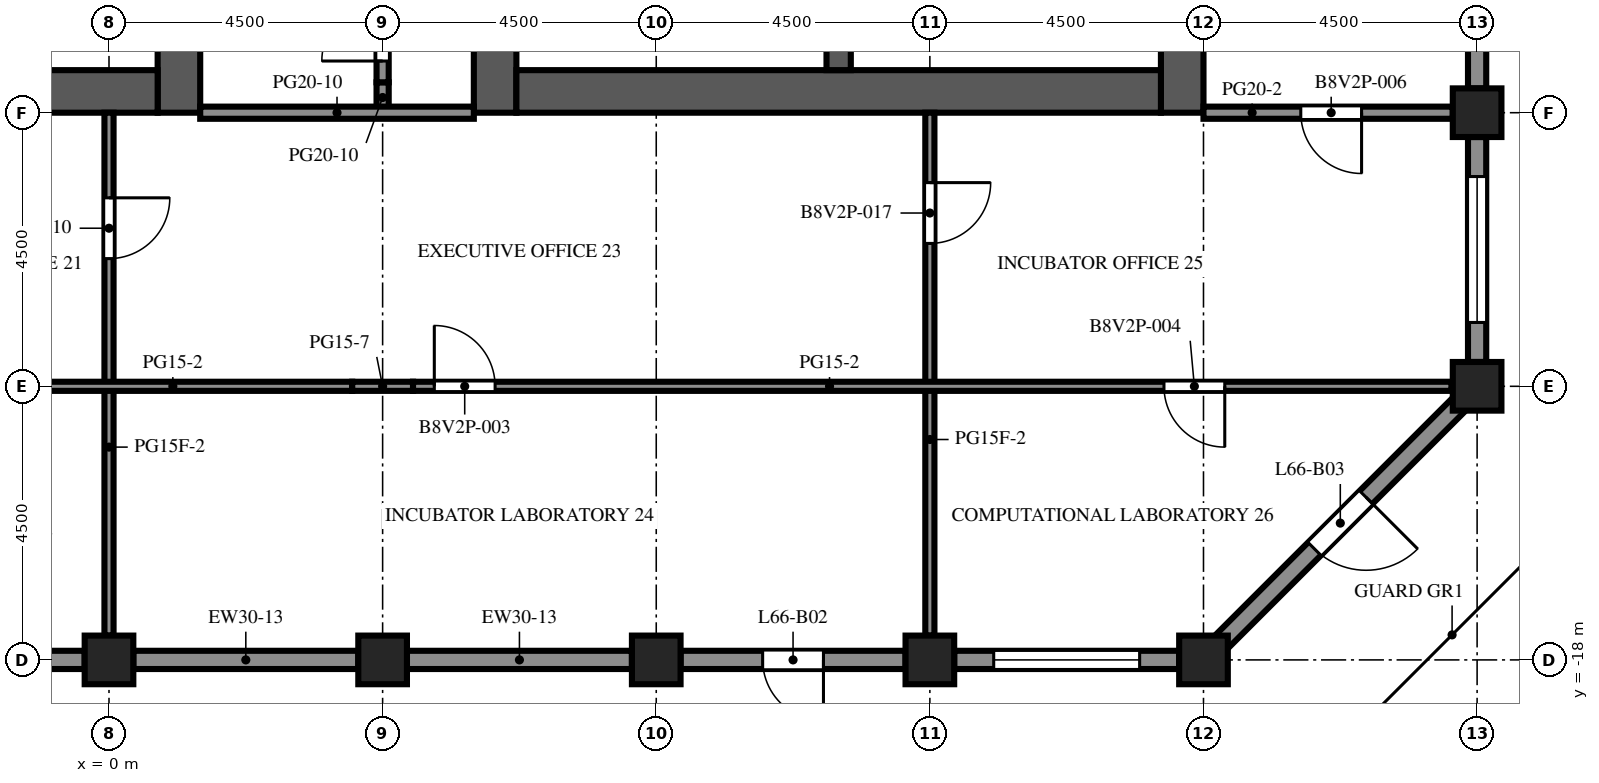
"""IFC4 building model, lengths in metres.
Left out: names, types, materials, properties, quantities, classifications, styles, units other than length and angle.
Written with IfcOpenShell. Run it as: python <this file> out.ifc"""

import sys

from ifc_helpers import new_model, si_unit, direction, frame, frame_2d, origin, origin_2d, place, context, subcontext, project, spatial, rectangle, extrude, element, fill, save


model = new_model("IFC4")
c1 = context("Model", 3, precision=1e-05, world=origin(), true_north=direction((0.0, 1.0)))
c2 = subcontext(c1, "Body", "Model", "MODEL_VIEW")
j1 = project(units=[si_unit("LENGTHUNIT", "METRE"), si_unit("PLANEANGLEUNIT", "RADIAN")], contexts=[c1])
p1 = place(None, origin())
s1 = spatial("IfcSite", under=j1, at=p1, CompositionType="ELEMENT")
p2 = place(p1, origin())
s2 = spatial("IfcBuilding", under=s1, at=p2, CompositionType="ELEMENT")
p3 = place(p2, frame((0.0, 0.0, 290.9)))
s3 = spatial("IfcBuildingStorey", under=s2, at=p3, CompositionType="ELEMENT", Elevation=290.9)
for number, where, z_axis, x_axis in (
    (1, (0.0, -18.0, 0.0), (0.0, 0.0, 1.0), (1.0, 0.0, 0.0)),
    (2, (4.5, -18.0, 0.0), (0.0, 0.0, 1.0), (1.0, 0.0, 0.0)),
    (3, (9.0, -18.0, 0.0), (0.0, 0.0, 1.0), (1.0, 0.0, 0.0)),
    (4, (13.5, -18.0, 0.0), (0.0, 0.0, 1.0), (1.0, 0.0, 0.0)),
    (5, (18.0, -18.0, 0.0), (0.0, 0.0, 1.0), (1.0, 0.0, 0.0)),
    (6, (22.5, -13.5, 0.0), (0.0, 0.0, 1.0), (1.0, 0.0, 0.0)),
    (7, (22.5, -9.0, 0.0), (0.0, 0.0, 1.0), (1.0, 0.0, 0.0)),
):
    element("IfcColumn", number, at=place(p3, frame(where, z_axis=z_axis, x_axis=x_axis)), inside=s3, PredefinedType="COLUMN", context=c2, shape_type="SweptSolid", body=[
        extrude(rectangle(XDim=0.8, YDim=0.8, at=origin_2d()), origin(), (0.0, 0.0, 1.0), 4.1),
    ])
p4 = place(p3, frame((1.15, -9.0, 0.0), z_axis=(0.0, 0.0, 1.0), x_axis=(0.0, 1.0, 0.0)))
e8 = element("IfcWall", 8, at=p4, inside=s3, PredefinedType="SHEAR", context=c2, shape_type="SweptSolid", body=[
    extrude(rectangle(XDim=27.5, YDim=0.7, at=frame_2d((13.75, 0.0))), origin(), (0.0, 0.0, 1.0), 4.1),
])
p5 = place(p4, frame((12.55, 0.0, 0.0)))
e9 = element("IfcOpeningElement", 9, at=p5, cuts=e8, PredefinedType="OPENING", context=c2, shape_type="SweptSolid", body=[
    extrude(rectangle(XDim=2.4, YDim=2.4, at=frame_2d((1.2, 1.2))), frame((0.0, 0.36, 0.0), z_axis=(0.0, -1.0, 0.0), x_axis=(1.0, 0.0, 0.0)), (0.0, 0.0, 1.0), 0.72),
])
p6 = place(p4, frame((3.9, 0.0, 0.0)))
e10 = element("IfcOpeningElement", 10, at=p6, cuts=e8, PredefinedType="OPENING", context=c2, shape_type="SweptSolid", body=[
    extrude(rectangle(XDim=1.2, YDim=2.1, at=frame_2d((0.6, 1.05))), frame((0.0, 0.36, 0.0), z_axis=(0.0, -1.0, 0.0), x_axis=(1.0, 0.0, 0.0)), (0.0, 0.0, 1.0), 0.72),
])
p7 = place(p4, frame((22.4, 0.0, 0.0)))
e11 = element("IfcOpeningElement", 11, at=p7, cuts=e8, PredefinedType="OPENING", context=c2, shape_type="SweptSolid", body=[
    extrude(rectangle(XDim=1.2, YDim=2.1, at=frame_2d((0.6, 1.05))), frame((0.0, 0.36, 0.0), z_axis=(0.0, -1.0, 0.0), x_axis=(1.0, 0.0, 0.0)), (0.0, 0.0, 1.0), 0.72),
])
p8 = place(p3, frame((-9.8, -8.65, 0.0), z_axis=(0.0, 0.0, 1.0), x_axis=(1.0, 0.0, 0.0)))
e12 = element("IfcWall", 12, at=p8, inside=s3, PredefinedType="SHEAR", context=c2, shape_type="SweptSolid", body=[
    extrude(rectangle(XDim=10.6, YDim=0.7, at=frame_2d((5.3, 0.0))), origin(), (0.0, 0.0, 1.0), 4.1),
])
p9 = place(p3, frame((6.35, -9.0, 0.0), z_axis=(0.0, 0.0, 1.0), x_axis=(0.0, 1.0, 0.0)))
e13 = element("IfcWall", 13, at=p9, inside=s3, PredefinedType="SHEAR", context=c2, shape_type="SweptSolid", body=[
    extrude(rectangle(XDim=27.5, YDim=0.7, at=frame_2d((13.75, 0.0))), origin(), (0.0, 0.0, 1.0), 4.1),
])
p10 = place(p9, frame((12.55, 0.0, 0.0)))
e14 = element("IfcOpeningElement", 14, at=p10, cuts=e13, PredefinedType="OPENING", context=c2, shape_type="SweptSolid", body=[
    extrude(rectangle(XDim=2.4, YDim=2.4, at=frame_2d((1.2, 1.2))), frame((0.0, 0.36, 0.0), z_axis=(0.0, -1.0, 0.0), x_axis=(1.0, 0.0, 0.0)), (0.0, 0.0, 1.0), 0.72),
])
p11 = place(p9, frame((3.9, 0.0, 0.0)))
e15 = element("IfcOpeningElement", 15, at=p11, cuts=e13, PredefinedType="OPENING", context=c2, shape_type="SweptSolid", body=[
    extrude(rectangle(XDim=1.2, YDim=2.1, at=frame_2d((0.6, 1.05))), frame((0.0, 0.36, 0.0), z_axis=(0.0, -1.0, 0.0), x_axis=(1.0, 0.0, 0.0)), (0.0, 0.0, 1.0), 0.72),
])
p12 = place(p9, frame((22.4, 0.0, 0.0)))
e16 = element("IfcOpeningElement", 16, at=p12, cuts=e13, PredefinedType="OPENING", context=c2, shape_type="SweptSolid", body=[
    extrude(rectangle(XDim=1.2, YDim=2.1, at=frame_2d((0.6, 1.05))), frame((0.0, 0.36, 0.0), z_axis=(0.0, -1.0, 0.0), x_axis=(1.0, 0.0, 0.0)), (0.0, 0.0, 1.0), 0.72),
])
p13 = place(p3, frame((17.65, -9.0, 0.0), z_axis=(0.0, 0.0, 1.0), x_axis=(0.0, 1.0, 0.0)))
e17 = element("IfcWall", 17, at=p13, inside=s3, PredefinedType="SHEAR", context=c2, shape_type="SweptSolid", body=[
    extrude(rectangle(XDim=27.5, YDim=0.7, at=frame_2d((13.75, 0.0))), origin(), (0.0, 0.0, 1.0), 4.1),
])
p14 = place(p13, frame((12.55, 0.0, 0.0)))
e18 = element("IfcOpeningElement", 18, at=p14, cuts=e17, PredefinedType="OPENING", context=c2, shape_type="SweptSolid", body=[
    extrude(rectangle(XDim=2.4, YDim=2.4, at=frame_2d((1.2, 1.2))), frame((0.0, 0.36, 0.0), z_axis=(0.0, -1.0, 0.0), x_axis=(1.0, 0.0, 0.0)), (0.0, 0.0, 1.0), 0.72),
])
p15 = place(p13, frame((6.825, 0.0, 0.0)))
e19 = element("IfcOpeningElement", 19, at=p15, cuts=e17, PredefinedType="OPENING", context=c2, shape_type="SweptSolid", body=[
    extrude(rectangle(XDim=1.2, YDim=2.1, at=frame_2d((0.6, 1.05))), frame((0.0, 0.36, 0.0), z_axis=(0.0, -1.0, 0.0), x_axis=(1.0, 0.0, 0.0)), (0.0, 0.0, 1.0), 0.72),
])
p16 = place(p13, frame((19.475, 0.0, 0.0)))
e20 = element("IfcOpeningElement", 20, at=p16, cuts=e17, PredefinedType="OPENING", context=c2, shape_type="SweptSolid", body=[
    extrude(rectangle(XDim=1.2, YDim=2.1, at=frame_2d((0.6, 1.05))), frame((0.0, 0.36, 0.0), z_axis=(0.0, -1.0, 0.0), x_axis=(1.0, 0.0, 0.0)), (0.0, 0.0, 1.0), 0.72),
])
p17 = place(p3, frame((6.7, -8.65, 0.0), z_axis=(0.0, 0.0, 1.0), x_axis=(1.0, 0.0, 0.0)))
e21 = element("IfcWall", 21, at=p17, inside=s3, PredefinedType="SHEAR", context=c2, shape_type="SweptSolid", body=[
    extrude(rectangle(XDim=10.6, YDim=0.7, at=frame_2d((5.3, 0.0))), origin(), (0.0, 0.0, 1.0), 4.1),
])
p18 = place(p3, frame((12.0, -8.3, 0.0), z_axis=(0.0, 0.0, 1.0), x_axis=(0.0, 1.0, 0.0)))
e22 = element("IfcWall", 22, at=p18, inside=s3, PredefinedType="SHEAR", context=c2, shape_type="SweptSolid", body=[
    extrude(rectangle(XDim=7.6, YDim=0.4, at=frame_2d((3.8, 0.0))), origin(), (0.0, 0.0, 1.0), 4.1),
])
for number, where, z_axis, x_axis in (
    (23, (-0.4, -18.0, 0.0), (0.0, 0.0, 1.0), (-1.0, 0.0, 0.0)),
    (24, (4.1, -18.0, 0.0), (0.0, 0.0, 1.0), (-1.0, 0.0, 0.0)),
    (25, (8.6, -18.0, 0.0), (0.0, 0.0, 1.0), (-1.0, 0.0, 0.0)),
):
    element("IfcWall", number, at=place(p3, frame(where, z_axis=z_axis, x_axis=x_axis)), inside=s3, PredefinedType="SOLIDWALL", context=c2, shape_type="SweptSolid", body=[
        extrude(rectangle(XDim=3.7, YDim=0.3, at=frame_2d((1.85, 0.0))), origin(), (0.0, 0.0, 1.0), 1.5),
    ])
p19 = place(p3, frame((13.1, -18.0, 0.0), z_axis=(0.0, 0.0, 1.0), x_axis=(-1.0, 0.0, 0.0)))
e26 = element("IfcWall", 26, at=p19, inside=s3, PredefinedType="SOLIDWALL", context=c2, shape_type="SweptSolid", body=[
    extrude(rectangle(XDim=3.7, YDim=0.3, at=frame_2d((1.85, 0.0))), origin(), (0.0, 0.0, 1.0), 2.7),
])
p20 = place(p19, frame((1.35, 0.0, 0.0)))
e27 = element("IfcOpeningElement", 27, at=p20, cuts=e26, PredefinedType="OPENING", context=c2, shape_type="SweptSolid", body=[
    extrude(rectangle(XDim=1.0, YDim=2.2, at=frame_2d((0.5, 1.1))), frame((0.0, 0.16, 0.0), z_axis=(0.0, -1.0, 0.0), x_axis=(1.0, 0.0, 0.0)), (0.0, 0.0, 1.0), 0.32),
])
p21 = place(p3, frame((17.6, -18.0, 0.0), z_axis=(0.0, 0.0, 1.0), x_axis=(-1.0, 0.0, 0.0)))
e28 = element("IfcWall", 28, at=p21, inside=s3, PredefinedType="SOLIDWALL", context=c2, shape_type="SweptSolid", body=[
    extrude(rectangle(XDim=3.7, YDim=0.3, at=frame_2d((1.85, 0.0))), origin(), (0.0, 0.0, 1.0), 2.7),
])
p22 = place(p21, frame((0.65, 0.0, 0.8)))
e29 = element("IfcOpeningElement", 29, at=p22, cuts=e28, PredefinedType="OPENING", context=c2, shape_type="SweptSolid", body=[
    extrude(rectangle(XDim=2.4, YDim=1.7, at=frame_2d((1.2, 0.85))), frame((0.0, 0.16, 0.0), z_axis=(0.0, -1.0, 0.0), x_axis=(1.0, 0.0, 0.0)), (0.0, 0.0, 1.0), 0.32),
])
p23 = place(p3, frame((22.206, -13.794, 0.0), z_axis=(0.0, 0.0, 1.0), x_axis=(-0.707106781187, -0.707106781187, 0.0)))
e30 = element("IfcWall", 30, at=p23, inside=s3, PredefinedType="SOLIDWALL", context=c2, shape_type="SweptSolid", body=[
    extrude(rectangle(XDim=5.532, YDim=0.3, at=frame_2d((2.766, 0.0))), origin(), (0.0, 0.0, 1.0), 2.7),
])
p24 = place(p23, frame((2.166, 0.0, 0.0)))
e31 = element("IfcOpeningElement", 31, at=p24, cuts=e30, PredefinedType="OPENING", context=c2, shape_type="SweptSolid", body=[
    extrude(rectangle(XDim=1.2, YDim=2.2, at=frame_2d((0.6, 1.1))), frame((0.0, 0.16, 0.0), z_axis=(0.0, -1.0, 0.0), x_axis=(1.0, 0.0, 0.0)), (0.0, 0.0, 1.0), 0.32),
])
p25 = place(p3, frame((22.5, -9.4, 0.0), z_axis=(0.0, 0.0, 1.0), x_axis=(0.0, -1.0, 0.0)))
e32 = element("IfcWall", 32, at=p25, inside=s3, PredefinedType="SOLIDWALL", context=c2, shape_type="SweptSolid", body=[
    extrude(rectangle(XDim=3.7, YDim=0.3, at=frame_2d((1.85, 0.0))), origin(), (0.0, 0.0, 1.0), 2.7),
])
p26 = place(p25, frame((0.65, 0.0, 0.8)))
e33 = element("IfcOpeningElement", 33, at=p26, cuts=e32, PredefinedType="OPENING", context=c2, shape_type="SweptSolid", body=[
    extrude(rectangle(XDim=2.4, YDim=1.7, at=frame_2d((1.2, 0.85))), frame((0.0, 0.16, 0.0), z_axis=(0.0, -1.0, 0.0), x_axis=(1.0, 0.0, 0.0)), (0.0, 0.0, 1.0), 0.32),
])
p27 = place(p3, frame((22.5, -4.9, 0.0), z_axis=(0.0, 0.0, 1.0), x_axis=(0.0, -1.0, 0.0)))
e34 = element("IfcWall", 34, at=p27, inside=s3, PredefinedType="SOLIDWALL", context=c2, shape_type="SweptSolid", body=[
    extrude(rectangle(XDim=3.7, YDim=0.3, at=frame_2d((1.85, 0.0))), origin(), (0.0, 0.0, 1.0), 2.7),
])
p28 = place(p27, frame((1.35, 0.0, 0.0)))
e35 = element("IfcOpeningElement", 35, at=p28, cuts=e34, PredefinedType="OPENING", context=c2, shape_type="SweptSolid", body=[
    extrude(rectangle(XDim=1.0, YDim=2.2, at=frame_2d((0.5, 1.1))), frame((0.0, 0.16, 0.0), z_axis=(0.0, -1.0, 0.0), x_axis=(1.0, 0.0, 0.0)), (0.0, 0.0, 1.0), 0.32),
])
p29 = place(p3, frame((-0.7, -8.3, 0.0), z_axis=(0.0, 0.0, 1.0), x_axis=(0.0, 1.0, 0.0)))
e36 = element("IfcWall", 36, at=p29, inside=s3, PredefinedType="PARTITIONING", context=c2, shape_type="SweptSolid", body=[
    extrude(rectangle(XDim=2.28, YDim=0.1, at=frame_2d((1.14, 0.0))), origin(), (0.0, 0.0, 1.0), 3.5),
])
p30 = place(p29, frame((0.64, 0.0, 0.0)))
e37 = element("IfcOpeningElement", 37, at=p30, cuts=e36, PredefinedType="OPENING", context=c2, shape_type="SweptSolid", body=[
    extrude(rectangle(XDim=1.0, YDim=2.1, at=frame_2d((0.5, 1.05))), frame((0.0, 0.06, 0.0), z_axis=(0.0, -1.0, 0.0), x_axis=(1.0, 0.0, 0.0)), (0.0, 0.0, 1.0), 0.12),
])
p31 = place(p3, frame((8.2, -8.3, 0.0), z_axis=(0.0, 0.0, 1.0), x_axis=(0.0, 1.0, 0.0)))
e38 = element("IfcWall", 38, at=p31, inside=s3, PredefinedType="PARTITIONING", context=c2, shape_type="SweptSolid", body=[
    extrude(rectangle(XDim=2.28, YDim=0.1, at=frame_2d((1.14, 0.0))), origin(), (0.0, 0.0, 1.0), 3.5),
])
p32 = place(p31, frame((0.64, 0.0, 0.0)))
e39 = element("IfcOpeningElement", 39, at=p32, cuts=e38, PredefinedType="OPENING", context=c2, shape_type="SweptSolid", body=[
    extrude(rectangle(XDim=1.0, YDim=2.1, at=frame_2d((0.5, 1.05))), frame((0.0, 0.06, 0.0), z_axis=(0.0, -1.0, 0.0), x_axis=(1.0, 0.0, 0.0)), (0.0, 0.0, 1.0), 0.12),
])
p33 = place(p3, frame((0.0, -17.6, 0.0), z_axis=(0.0, 0.0, 1.0), x_axis=(0.0, 1.0, 0.0)))
e40 = element("IfcWall", 40, at=p33, inside=s3, PredefinedType="PARTITIONING", context=c2, shape_type="SweptSolid", body=[
    extrude(rectangle(XDim=8.6, YDim=0.15, at=frame_2d((4.3, 0.0))), origin(), (0.0, 0.0, 1.0), 3.5),
])
p34 = place(p33, frame((6.2, 0.0, 0.0)))
e41 = element("IfcOpeningElement", 41, at=p34, cuts=e40, PredefinedType="OPENING", context=c2, shape_type="SweptSolid", body=[
    extrude(rectangle(XDim=1.0, YDim=2.1, at=frame_2d((0.5, 1.05))), frame((0.0, 0.085, 0.0), z_axis=(0.0, -1.0, 0.0), x_axis=(1.0, 0.0, 0.0)), (0.0, 0.0, 1.0), 0.17),
])
p35 = place(p3, frame((4.5, -9.0, 0.0), z_axis=(0.0, 0.0, 1.0), x_axis=(0.0, 1.0, 0.0)))
e42 = element("IfcWall", 42, at=p35, inside=s3, PredefinedType="PARTITIONING", context=c2, shape_type="SweptSolid", body=[
    extrude(rectangle(XDim=0.5, YDim=0.2, at=frame_2d((0.25, 0.0))), origin(), (0.0, 0.0, 1.0), 1.47),
])
p36 = place(p3, frame((4.5, -6.0, 0.0), z_axis=(0.0, 0.0, 1.0), x_axis=(0.0, -1.0, 0.0)))
e43 = element("IfcWall", 43, at=p36, inside=s3, PredefinedType="PARTITIONING", context=c2, shape_type="SweptSolid", body=[
    extrude(rectangle(XDim=2.5, YDim=0.2, at=frame_2d((1.25, 0.0))), origin(), (0.0, 0.0, 1.0), 3.5),
])
p37 = place(p36, frame((1.15, 0.0, 0.0)))
e44 = element("IfcOpeningElement", 44, at=p37, cuts=e43, PredefinedType="OPENING", context=c2, shape_type="SweptSolid", body=[
    extrude(rectangle(XDim=1.0, YDim=2.1, at=frame_2d((0.5, 1.05))), frame((0.0, 0.11, 0.0), z_axis=(0.0, -1.0, 0.0), x_axis=(1.0, 0.0, 0.0)), (0.0, 0.0, 1.0), 0.22),
])
p38 = place(p3, frame((13.5, -17.6, 0.0), z_axis=(0.0, 0.0, 1.0), x_axis=(0.0, 1.0, 0.0)))
e45 = element("IfcWall", 45, at=p38, inside=s3, PredefinedType="PARTITIONING", context=c2, shape_type="SweptSolid", body=[
    extrude(rectangle(XDim=8.6, YDim=0.15, at=frame_2d((4.3, 0.0))), origin(), (0.0, 0.0, 1.0), 3.5),
])
p39 = place(p38, frame((6.45, 0.0, 0.0)))
e46 = element("IfcOpeningElement", 46, at=p39, cuts=e45, PredefinedType="OPENING", context=c2, shape_type="SweptSolid", body=[
    extrude(rectangle(XDim=1.0, YDim=2.1, at=frame_2d((0.5, 1.05))), frame((0.0, 0.085, 0.0), z_axis=(0.0, -1.0, 0.0), x_axis=(1.0, 0.0, 0.0)), (0.0, 0.0, 1.0), 0.17),
])
p40 = place(p3, frame((4.0, -13.5, 0.0), z_axis=(0.0, 0.0, 1.0), x_axis=(-1.0, 0.0, 0.0)))
e47 = element("IfcWall", 47, at=p40, inside=s3, PredefinedType="PARTITIONING", context=c2, shape_type="SweptSolid", body=[
    extrude(rectangle(XDim=8.0, YDim=0.15, at=frame_2d((4.0, 0.0))), origin(), (0.0, 0.0, 1.0), 3.5),
])
p41 = place(p40, frame((5.9, 0.0, 0.0)))
e48 = element("IfcOpeningElement", 48, at=p41, cuts=e47, PredefinedType="OPENING", context=c2, shape_type="SweptSolid", body=[
    extrude(rectangle(XDim=1.0, YDim=2.1, at=frame_2d((0.5, 1.05))), frame((0.0, 0.085, 0.0), z_axis=(0.0, -1.0, 0.0), x_axis=(1.0, 0.0, 0.0)), (0.0, 0.0, 1.0), 0.17),
])
p42 = place(p3, frame((4.0, -13.5, 0.0), z_axis=(0.0, 0.0, 1.0), x_axis=(1.0, 0.0, 0.0)))
e49 = element("IfcWall", 49, at=p42, inside=s3, PredefinedType="PARTITIONING", context=c2, shape_type="SweptSolid", body=[
    extrude(rectangle(XDim=1.0, YDim=0.15, at=frame_2d((0.5, 0.0))), origin(), (0.0, 0.0, 1.0), 1.47),
])
p43 = place(p3, frame((22.077, -13.5, 0.0), z_axis=(0.0, 0.0, 1.0), x_axis=(-1.0, 0.0, 0.0)))
e50 = element("IfcWall", 50, at=p43, inside=s3, PredefinedType="PARTITIONING", context=c2, shape_type="SweptSolid", body=[
    extrude(rectangle(XDim=17.077, YDim=0.15, at=frame_2d((8.539, 0.0))), origin(), (0.0, 0.0, 1.0), 3.5),
])
p44 = place(p43, frame((15.727, 0.0, 0.0)))
e51 = element("IfcOpeningElement", 51, at=p44, cuts=e50, PredefinedType="OPENING", context=c2, shape_type="SweptSolid", body=[
    extrude(rectangle(XDim=1.0, YDim=2.1, at=frame_2d((0.5, 1.05))), frame((0.0, 0.085, 0.0), z_axis=(0.0, -1.0, 0.0), x_axis=(1.0, 0.0, 0.0)), (0.0, 0.0, 1.0), 0.17),
])
p45 = place(p43, frame((3.727, 0.0, 0.0)))
e52 = element("IfcOpeningElement", 52, at=p45, cuts=e50, PredefinedType="OPENING", context=c2, shape_type="SweptSolid", body=[
    extrude(rectangle(XDim=1.0, YDim=2.1, at=frame_2d((0.5, 1.05))), frame((0.0, 0.085, 0.0), z_axis=(0.0, -1.0, 0.0), x_axis=(1.0, 0.0, 0.0)), (0.0, 0.0, 1.0), 0.17),
])
p46 = place(p3, frame((1.5, -9.0, 0.0), z_axis=(0.0, 0.0, 1.0), x_axis=(1.0, 0.0, 0.0)))
e53 = element("IfcWall", 53, at=p46, inside=s3, PredefinedType="PARTITIONING", context=c2, shape_type="SweptSolid", body=[
    extrude(rectangle(XDim=4.5, YDim=0.2, at=frame_2d((2.25, 0.0))), origin(), (0.0, 0.0, 1.0), 1.47),
])
p47 = place(p3, frame((22.1, -9.0, 0.0), z_axis=(0.0, 0.0, 1.0), x_axis=(-1.0, 0.0, 0.0)))
e54 = element("IfcWall", 54, at=p47, inside=s3, PredefinedType="PARTITIONING", context=c2, shape_type="SweptSolid", body=[
    extrude(rectangle(XDim=4.1, YDim=0.2, at=frame_2d((2.05, 0.0))), origin(), (0.0, 0.0, 1.0), 3.5),
])
p48 = place(p47, frame((1.5, 0.0, 0.0)))
e55 = element("IfcOpeningElement", 55, at=p48, cuts=e54, PredefinedType="OPENING", context=c2, shape_type="SweptSolid", body=[
    extrude(rectangle(XDim=1.0, YDim=2.1, at=frame_2d((0.5, 1.05))), frame((0.0, 0.11, 0.0), z_axis=(0.0, -1.0, 0.0), x_axis=(1.0, 0.0, 0.0)), (0.0, 0.0, 1.0), 0.22),
])
p49 = place(p20, origin())
e56 = element("IfcDoor", 56, at=p49, inside=s3, OperationType="SINGLE_SWING_LEFT", PredefinedType="DOOR", context=c2, shape_type="SweptSolid", body=[
    extrude(rectangle(XDim=1.0, YDim=2.2, at=frame_2d((0.5, 1.1))), frame((0.0, 0.025, 0.0), z_axis=(0.0, -1.0, 0.0), x_axis=(1.0, 0.0, 0.0)), (0.0, 0.0, 1.0), 0.05),
])
fill(e27, e56)
p50 = place(p22, origin())
e57 = element("IfcWindow", 57, at=p50, inside=s3, PartitioningType="SINGLE_PANEL", PredefinedType="WINDOW", context=c2, shape_type="SweptSolid", body=[
    extrude(rectangle(XDim=2.4, YDim=1.7, at=frame_2d((1.2, 0.85))), frame((0.0, 0.03, 0.0), z_axis=(0.0, -1.0, 0.0), x_axis=(1.0, 0.0, 0.0)), (0.0, 0.0, 1.0), 0.06),
])
fill(e29, e57)
p51 = place(p24, origin())
e58 = element("IfcDoor", 58, at=p51, inside=s3, OperationType="SINGLE_SWING_LEFT", PredefinedType="DOOR", context=c2, shape_type="SweptSolid", body=[
    extrude(rectangle(XDim=1.2, YDim=2.2, at=frame_2d((0.6, 1.1))), frame((0.0, 0.025, 0.0), z_axis=(0.0, -1.0, 0.0), x_axis=(1.0, 0.0, 0.0)), (0.0, 0.0, 1.0), 0.05),
])
fill(e31, e58)
p52 = place(p26, origin())
e59 = element("IfcWindow", 59, at=p52, inside=s3, PartitioningType="SINGLE_PANEL", PredefinedType="WINDOW", context=c2, shape_type="SweptSolid", body=[
    extrude(rectangle(XDim=2.4, YDim=1.7, at=frame_2d((1.2, 0.85))), frame((0.0, 0.03, 0.0), z_axis=(0.0, -1.0, 0.0), x_axis=(1.0, 0.0, 0.0)), (0.0, 0.0, 1.0), 0.06),
])
fill(e33, e59)
p53 = place(p44, origin())
e60 = element("IfcDoor", 60, at=p53, inside=s3, OperationType="SINGLE_SWING_RIGHT", PredefinedType="DOOR", context=c2, shape_type="SweptSolid", body=[
    extrude(rectangle(XDim=1.0, YDim=2.1, at=frame_2d((0.5, 1.05))), frame((0.0, 0.025, 0.0), z_axis=(0.0, -1.0, 0.0), x_axis=(1.0, 0.0, 0.0)), (0.0, 0.0, 1.0), 0.05),
])
fill(e51, e60)
p54 = place(p45, origin())
e61 = element("IfcDoor", 61, at=p54, inside=s3, OperationType="SINGLE_SWING_LEFT", PredefinedType="DOOR", context=c2, shape_type="SweptSolid", body=[
    extrude(rectangle(XDim=1.0, YDim=2.1, at=frame_2d((0.5, 1.05))), frame((0.0, 0.025, 0.0), z_axis=(0.0, -1.0, 0.0), x_axis=(1.0, 0.0, 0.0)), (0.0, 0.0, 1.0), 0.05),
])
fill(e52, e61)
p55 = place(p48, origin())
e62 = element("IfcDoor", 62, at=p55, inside=s3, OperationType="SINGLE_SWING_LEFT", PredefinedType="DOOR", context=c2, shape_type="SweptSolid", body=[
    extrude(rectangle(XDim=1.0, YDim=2.1, at=frame_2d((0.5, 1.05))), frame((0.0, 0.025, 0.0), z_axis=(0.0, -1.0, 0.0), x_axis=(1.0, 0.0, 0.0)), (0.0, 0.0, 1.0), 0.05),
])
fill(e55, e62)
p56 = place(p34, origin())
e63 = element("IfcDoor", 63, at=p56, inside=s3, OperationType="SINGLE_SWING_RIGHT", PredefinedType="DOOR", context=c2, shape_type="SweptSolid", body=[
    extrude(rectangle(XDim=1.0, YDim=2.1, at=frame_2d((0.5, 1.05))), frame((0.0, 0.025, 0.0), z_axis=(0.0, -1.0, 0.0), x_axis=(1.0, 0.0, 0.0)), (0.0, 0.0, 1.0), 0.05),
])
fill(e41, e63)
p57 = place(p37, origin())
e64 = element("IfcDoor", 64, at=p57, inside=s3, OperationType="SINGLE_SWING_RIGHT", PredefinedType="DOOR", context=c2, shape_type="SweptSolid", body=[
    extrude(rectangle(XDim=1.0, YDim=2.1, at=frame_2d((0.5, 1.05))), frame((0.0, 0.025, 0.0), z_axis=(0.0, -1.0, 0.0), x_axis=(1.0, 0.0, 0.0)), (0.0, 0.0, 1.0), 0.05),
])
fill(e44, e64)
p58 = place(p39, origin())
e65 = element("IfcDoor", 65, at=p58, inside=s3, OperationType="SINGLE_SWING_RIGHT", PredefinedType="DOOR", context=c2, shape_type="SweptSolid", body=[
    extrude(rectangle(XDim=1.0, YDim=2.1, at=frame_2d((0.5, 1.05))), frame((0.0, 0.025, 0.0), z_axis=(0.0, -1.0, 0.0), x_axis=(1.0, 0.0, 0.0)), (0.0, 0.0, 1.0), 0.05),
])
fill(e46, e65)
save(model, sys.argv[1])
